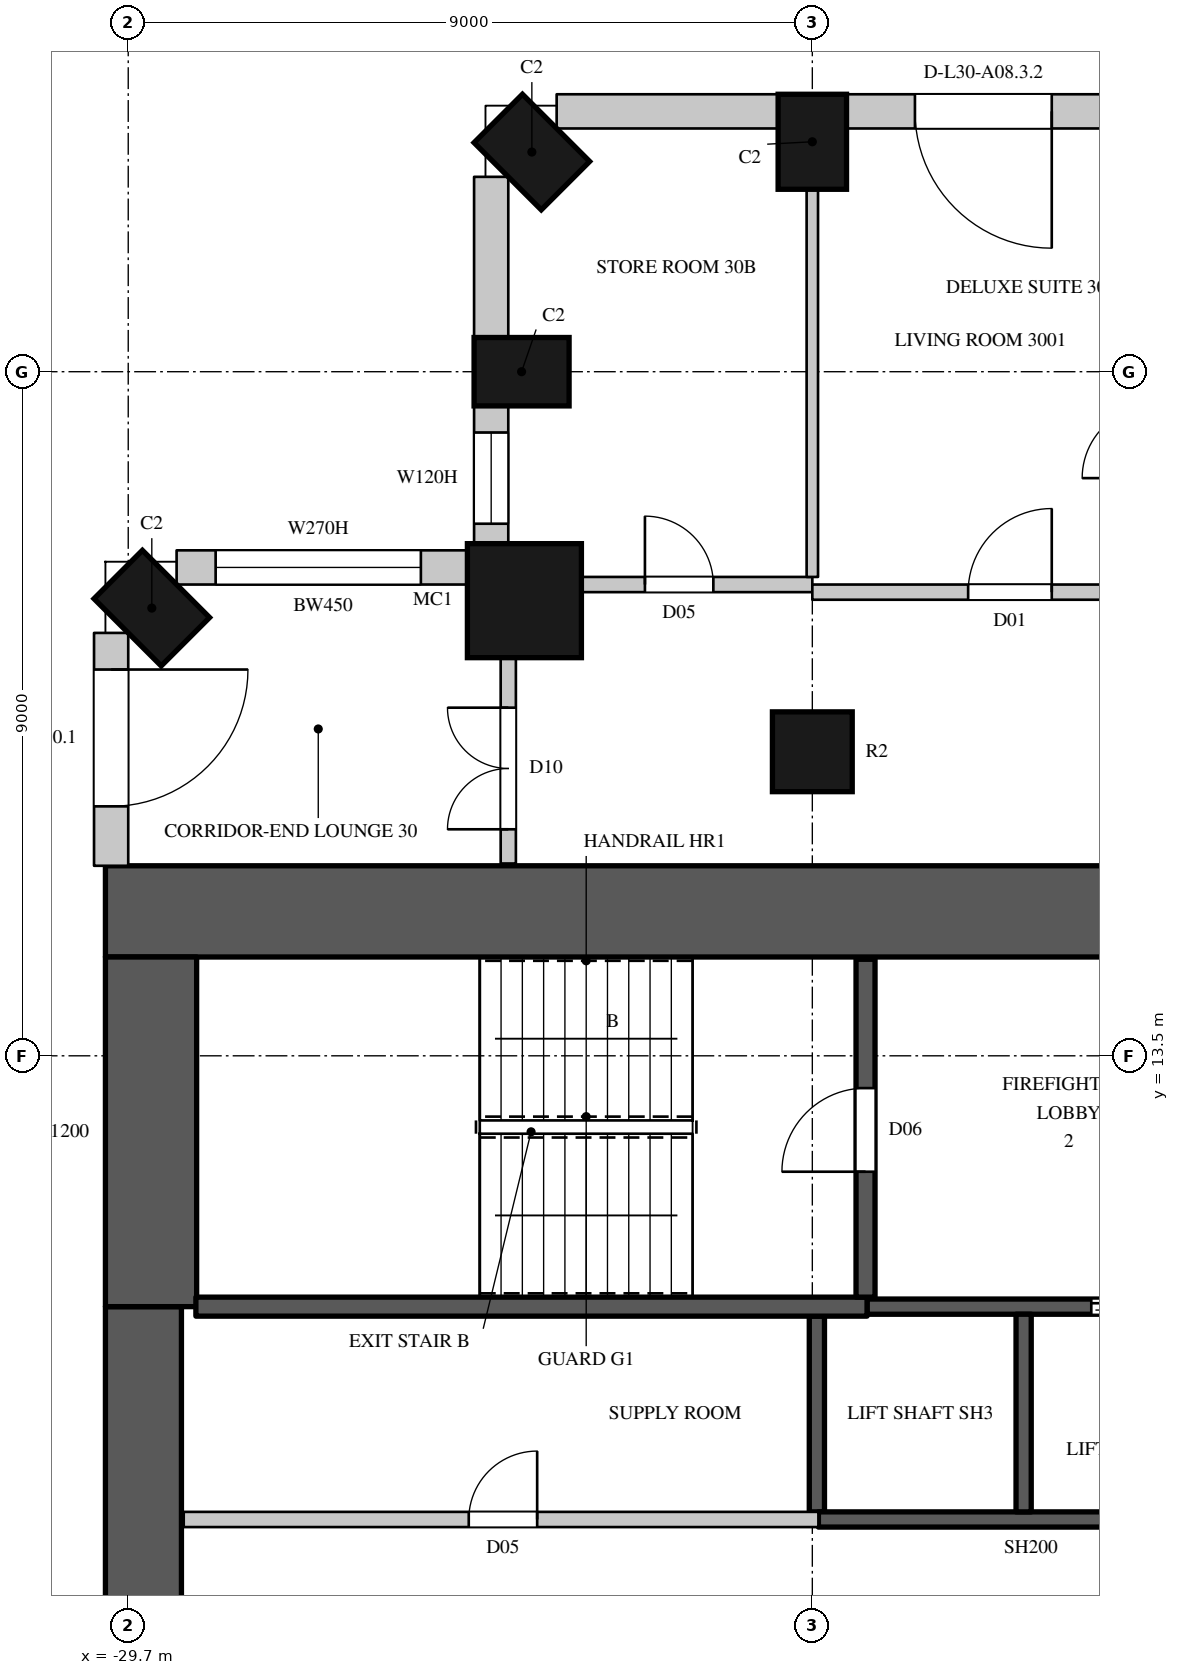
"""IFC4 building model, lengths in metres.
Left out: names, types, materials, properties, quantities, classifications, styles, units other than length and angle.
Written with IfcOpenShell. Run it as: python <this file> out.ifc"""

import sys

from ifc_helpers import new_model, si_unit, direction, frame, frame_2d, origin, origin_2d, place, context, subcontext, project, spatial, rectangle, circle, extrude, element, fill, save


model = new_model("IFC4")
c1 = context("Model", 3, precision=1e-05, world=origin(), true_north=direction((0.0, 1.0)))
c2 = subcontext(c1, "Body", "Model", "MODEL_VIEW")
j1 = project(units=[si_unit("LENGTHUNIT", "METRE"), si_unit("PLANEANGLEUNIT", "RADIAN")], contexts=[c1])
p1 = place(None, origin())
s1 = spatial("IfcSite", under=j1, at=p1, CompositionType="ELEMENT")
p2 = place(p1, origin())
s2 = spatial("IfcBuilding", under=s1, at=p2, CompositionType="ELEMENT")
p3 = place(p2, frame((0.0, 0.0, 138.3)))
s3 = spatial("IfcBuildingStorey", under=s2, at=p3, CompositionType="ELEMENT", Elevation=138.3)
for number, where, z_axis, x_axis in (
    (1, (-29.39, 19.39, 0.0), (0.0, 0.0, 1.0), (-0.707, -0.707, 0.0)),
    (2, (-20.7, 25.525, 0.0), (0.0, 0.0, 1.0), (-1.0, 0.0, 0.0)),
    (3, (-24.39, 25.39, 0.0), (0.0, 0.0, 1.0), (-0.707, -0.707, 0.0)),
    (4, (-24.525, 22.5, 0.0), (0.0, 0.0, 1.0), (0.0, -1.0, 0.0)),
):
    element("IfcColumn", number, at=place(p3, frame(where, z_axis=z_axis, x_axis=x_axis)), inside=s3, PredefinedType="COLUMN", context=c2, shape_type="SweptSolid", body=[
        extrude(rectangle(XDim=0.9, YDim=1.25, at=origin_2d()), origin(), (0.0, 0.0, 1.0), 3.6),
    ])
p4 = place(p3, frame((-24.488, 19.488, 0.0), z_axis=(0.0, 0.0, 1.0), x_axis=(1.0, 0.0, 0.0)))
e5 = element("IfcColumn", 5, at=p4, inside=s3, PredefinedType="COLUMN", context=c2, shape_type="SweptSolid", body=[
    extrude(circle(Radius=0.75, at=origin_2d()), origin(), (0.0, 0.0, 1.0), 3.6),
])
p5 = place(p3, frame((-20.7, 17.5, 0.0), z_axis=(0.0, 0.0, 1.0), x_axis=(1.0, 0.0, 0.0)))
e6 = element("IfcColumn", 6, at=p5, inside=s3, PredefinedType="COLUMN", context=c2, shape_type="SweptSolid", body=[
    extrude(circle(Radius=0.525, at=origin_2d()), origin(), (0.0, 0.0, 1.0), 3.6),
])
p6 = place(p3, frame((-29.925, 19.064, 0.0), z_axis=(0.0, 0.0, 1.0), x_axis=(0.0, -1.0, 0.0)))
e7 = element("IfcWall", 7, at=p6, inside=s3, PredefinedType="SOLIDWALL", context=c2, shape_type="SweptSolid", body=[
    extrude(rectangle(XDim=3.064, YDim=0.45, at=frame_2d((1.532, 0.0))), origin(), (0.0, 0.0, 1.0), 3.3),
])
p7 = place(p6, frame((0.482, 0.0, 0.0)))
e8 = element("IfcOpeningElement", 8, at=p7, cuts=e7, PredefinedType="OPENING", context=c2, shape_type="SweptSolid", body=[
    extrude(rectangle(XDim=1.8, YDim=2.4, at=frame_2d((0.9, 1.2))), frame((0.0, 0.235, 0.0), z_axis=(0.0, -1.0, 0.0), x_axis=(1.0, 0.0, 0.0)), (0.0, 0.0, 1.0), 0.47),
])
p8 = place(p3, frame((-12.15, 25.925, 0.0), z_axis=(0.0, 0.0, 1.0), x_axis=(-1.0, 0.0, 0.0)))
e9 = element("IfcWall", 9, at=p8, inside=s3, PredefinedType="SOLIDWALL", context=c2, shape_type="SweptSolid", body=[
    extrude(rectangle(XDim=8.1, YDim=0.45, at=frame_2d((4.05, 0.0))), origin(), (0.0, 0.0, 1.0), 3.3),
])
p9 = place(p8, frame((0.2, 0.0, 0.0)))
e10 = element("IfcOpeningElement", 10, at=p9, cuts=e9, PredefinedType="OPENING", context=c2, shape_type="SweptSolid", body=[
    extrude(rectangle(XDim=1.8, YDim=2.4, at=frame_2d((0.9, 1.2))), frame((0.0, 0.235, 0.0), z_axis=(0.0, -1.0, 0.0), x_axis=(1.0, 0.0, 0.0)), (0.0, 0.0, 1.0), 0.47),
])
p10 = place(p8, frame((2.2, 0.0, 1.05)))
e11 = element("IfcOpeningElement", 11, at=p10, cuts=e9, PredefinedType="OPENING", context=c2, shape_type="SweptSolid", body=[
    extrude(rectangle(XDim=1.2, YDim=2.0, at=frame_2d((0.6, 1.0))), frame((0.0, 0.235, 0.0), z_axis=(0.0, -1.0, 0.0), x_axis=(1.0, 0.0, 0.0)), (0.0, 0.0, 1.0), 0.47),
])
p11 = place(p8, frame((5.4, 0.0, 0.0)))
e12 = element("IfcOpeningElement", 12, at=p11, cuts=e9, PredefinedType="OPENING", context=c2, shape_type="SweptSolid", body=[
    extrude(rectangle(XDim=1.8, YDim=2.4, at=frame_2d((0.9, 1.2))), frame((0.0, 0.235, 0.0), z_axis=(0.0, -1.0, 0.0), x_axis=(1.0, 0.0, 0.0)), (0.0, 0.0, 1.0), 0.47),
])
p12 = place(p3, frame((-21.15, 25.925, 0.0), z_axis=(0.0, 0.0, 1.0), x_axis=(-1.0, 0.0, 0.0)))
e13 = element("IfcWall", 13, at=p12, inside=s3, PredefinedType="SOLIDWALL", context=c2, shape_type="SweptSolid", body=[
    extrude(rectangle(XDim=2.914, YDim=0.45, at=frame_2d((1.457, 0.0))), origin(), (0.0, 0.0, 1.0), 3.3),
])
p13 = place(p3, frame((-24.925, 25.064, 0.0), z_axis=(0.0, 0.0, 1.0), x_axis=(0.0, -1.0, 0.0)))
e14 = element("IfcWall", 14, at=p13, inside=s3, PredefinedType="SOLIDWALL", context=c2, shape_type="SweptSolid", body=[
    extrude(rectangle(XDim=2.114, YDim=0.45, at=frame_2d((1.057, 0.0))), origin(), (0.0, 0.0, 1.0), 3.3),
])
p14 = place(p3, frame((-24.925, 22.05, 0.0), z_axis=(0.0, 0.0, 1.0), x_axis=(0.0, -1.0, 0.0)))
e15 = element("IfcWall", 15, at=p14, inside=s3, PredefinedType="SOLIDWALL", context=c2, shape_type="SweptSolid", body=[
    extrude(rectangle(XDim=1.843, YDim=0.45, at=frame_2d((0.921, 0.0))), origin(), (0.0, 0.0, 1.0), 3.3),
])
p15 = place(p14, frame((0.35, 0.0, 1.05)))
e16 = element("IfcOpeningElement", 16, at=p15, cuts=e15, PredefinedType="OPENING", context=c2, shape_type="SweptSolid", body=[
    extrude(rectangle(XDim=1.2, YDim=2.0, at=frame_2d((0.6, 1.0))), frame((0.0, 0.235, 0.0), z_axis=(0.0, -1.0, 0.0), x_axis=(1.0, 0.0, 0.0)), (0.0, 0.0, 1.0), 0.47),
])
p16 = place(p3, frame((-25.207, 19.925, 0.0), z_axis=(0.0, 0.0, 1.0), x_axis=(-1.0, 0.0, 0.0)))
e17 = element("IfcWall", 17, at=p16, inside=s3, PredefinedType="SOLIDWALL", context=c2, shape_type="SweptSolid", body=[
    extrude(rectangle(XDim=3.857, YDim=0.45, at=frame_2d((1.928, 0.0))), origin(), (0.0, 0.0, 1.0), 3.3),
])
p17 = place(p16, frame((0.643, 0.0, 1.05)))
e18 = element("IfcOpeningElement", 18, at=p17, cuts=e17, PredefinedType="OPENING", context=c2, shape_type="SweptSolid", body=[
    extrude(rectangle(XDim=2.7, YDim=2.0, at=frame_2d((1.35, 1.0))), frame((0.0, 0.235, 0.0), z_axis=(0.0, -1.0, 0.0), x_axis=(1.0, 0.0, 0.0)), (0.0, 0.0, 1.0), 0.47),
])
p18 = place(p3, frame((-30.0, 15.4, 0.0), z_axis=(0.0, 0.0, 1.0), x_axis=(1.0, 0.0, 0.0)))
e19 = element("IfcWall", 19, at=p18, inside=s3, PredefinedType="SHEAR", context=c2, shape_type="SweptSolid", body=[
    extrude(rectangle(XDim=16.0, YDim=1.2, at=frame_2d((8.0, 0.0))), origin(), (0.0, 0.0, 1.0), 3.6),
])
p19 = place(p18, frame((13.4, 0.0, 0.0)))
e20 = element("IfcOpeningElement", 20, at=p19, cuts=e19, PredefinedType="OPENING", context=c2, shape_type="SweptSolid", body=[
    extrude(rectangle(XDim=1.5, YDim=2.4, at=frame_2d((0.75, 1.2))), frame((0.0, 0.61, 0.0), z_axis=(0.0, -1.0, 0.0), x_axis=(1.0, 0.0, 0.0)), (0.0, 0.0, 1.0), 1.22),
])
p20 = place(p3, frame((-29.5, -10.2, 0.0), z_axis=(0.0, 0.0, 1.0), x_axis=(0.0, 1.0, 0.0)))
e21 = element("IfcWall", 21, at=p20, inside=s3, PredefinedType="SHEAR", context=c2, shape_type="SweptSolid", body=[
    extrude(rectangle(XDim=20.4, YDim=1.0, at=frame_2d((10.2, 0.0))), origin(), (0.0, 0.0, 1.0), 3.6),
])
p21 = place(p3, frame((-29.4, 10.2, 0.0), z_axis=(0.0, 0.0, 1.0), x_axis=(0.0, 1.0, 0.0)))
e22 = element("IfcWall", 22, at=p21, inside=s3, PredefinedType="SHEAR", context=c2, shape_type="SweptSolid", body=[
    extrude(rectangle(XDim=4.6, YDim=1.2, at=frame_2d((2.3, 0.0))), origin(), (0.0, 0.0, 1.0), 3.6),
])
p22 = place(p3, frame((-28.97, 7.4, 0.0), z_axis=(0.0, 0.0, 1.0), x_axis=(1.0, 0.0, 0.0)))
e23 = element("IfcWall", 23, at=p22, inside=s3, PredefinedType="PARTITIONING", context=c2, shape_type="SweptSolid", body=[
    extrude(rectangle(XDim=8.35, YDim=0.2, at=frame_2d((4.175, 0.0))), origin(), (0.0, 0.0, 1.0), 3.3),
])
p23 = place(p22, frame((3.75, 0.0, 0.0)))
e24 = element("IfcOpeningElement", 24, at=p23, cuts=e23, PredefinedType="OPENING", context=c2, shape_type="SweptSolid", body=[
    extrude(rectangle(XDim=0.9, YDim=2.2, at=frame_2d((0.45, 1.1))), frame((0.0, 0.11, 0.0), z_axis=(0.0, -1.0, 0.0), x_axis=(1.0, 0.0, 0.0)), (0.0, 0.0, 1.0), 0.22),
])
p24 = place(p3, frame((-24.7, 16.03, 0.0), z_axis=(0.0, 0.0, 1.0), x_axis=(0.0, 1.0, 0.0)))
e25 = element("IfcWall", 25, at=p24, inside=s3, PredefinedType="PARTITIONING", context=c2, shape_type="SweptSolid", body=[
    extrude(rectangle(XDim=2.722, YDim=0.2, at=frame_2d((1.361, 0.0))), origin(), (0.0, 0.0, 1.0), 3.3),
])
p25 = place(p24, frame((0.45, 0.0, 0.0)))
e26 = element("IfcOpeningElement", 26, at=p25, cuts=e25, PredefinedType="OPENING", context=c2, shape_type="SweptSolid", body=[
    extrude(rectangle(XDim=1.6, YDim=2.4, at=frame_2d((0.8, 1.2))), frame((0.0, 0.11, 0.0), z_axis=(0.0, -1.0, 0.0), x_axis=(1.0, 0.0, 0.0)), (0.0, 0.0, 1.0), 0.22),
])
p26 = place(p3, frame((-23.752, 19.7, 0.0), z_axis=(0.0, 0.0, 1.0), x_axis=(1.0, 0.0, 0.0)))
e27 = element("IfcWall", 27, at=p26, inside=s3, PredefinedType="PARTITIONING", context=c2, shape_type="SweptSolid", body=[
    extrude(rectangle(XDim=3.052, YDim=0.2, at=frame_2d((1.526, 0.0))), origin(), (0.0, 0.0, 1.0), 3.3),
])
p27 = place(p26, frame((0.85, 0.0, 0.0)))
e28 = element("IfcOpeningElement", 28, at=p27, cuts=e27, PredefinedType="OPENING", context=c2, shape_type="SweptSolid", body=[
    extrude(rectangle(XDim=0.9, YDim=2.2, at=frame_2d((0.45, 1.1))), frame((0.0, 0.11, 0.0), z_axis=(0.0, -1.0, 0.0), x_axis=(1.0, 0.0, 0.0)), (0.0, 0.0, 1.0), 0.22),
])
p28 = place(p3, frame((-20.7, 19.6, 0.0), z_axis=(0.0, 0.0, 1.0), x_axis=(1.0, 0.0, 0.0)))
e29 = element("IfcWall", 29, at=p28, inside=s3, PredefinedType="PARTITIONING", context=c2, shape_type="SweptSolid", body=[
    extrude(rectangle(XDim=38.214, YDim=0.2, at=frame_2d((19.107, 0.0))), origin(), (0.0, 0.0, 1.0), 3.3),
])
p29 = place(p28, frame((23.95, 0.0, 0.0)))
e30 = element("IfcOpeningElement", 30, at=p29, cuts=e29, PredefinedType="OPENING", context=c2, shape_type="SweptSolid", body=[
    extrude(rectangle(XDim=0.9, YDim=2.2, at=frame_2d((0.45, 1.1))), frame((0.0, 0.11, 0.0), z_axis=(0.0, -1.0, 0.0), x_axis=(1.0, 0.0, 0.0)), (0.0, 0.0, 1.0), 0.22),
])
p30 = place(p28, frame((2.05, 0.0, 0.0)))
e31 = element("IfcOpeningElement", 31, at=p30, cuts=e29, PredefinedType="OPENING", context=c2, shape_type="SweptSolid", body=[
    extrude(rectangle(XDim=1.1, YDim=2.4, at=frame_2d((0.55, 1.2))), frame((0.0, 0.11, 0.0), z_axis=(0.0, -1.0, 0.0), x_axis=(1.0, 0.0, 0.0)), (0.0, 0.0, 1.0), 0.22),
])
p31 = place(p28, frame((12.15, 0.0, 0.0)))
e32 = element("IfcOpeningElement", 32, at=p31, cuts=e29, PredefinedType="OPENING", context=c2, shape_type="SweptSolid", body=[
    extrude(rectangle(XDim=1.1, YDim=2.4, at=frame_2d((0.55, 1.2))), frame((0.0, 0.11, 0.0), z_axis=(0.0, -1.0, 0.0), x_axis=(1.0, 0.0, 0.0)), (0.0, 0.0, 1.0), 0.22),
])
p32 = place(p28, frame((30.2, 0.0, 0.0)))
e33 = element("IfcOpeningElement", 33, at=p32, cuts=e29, PredefinedType="OPENING", context=c2, shape_type="SweptSolid", body=[
    extrude(rectangle(XDim=0.95, YDim=2.2, at=frame_2d((0.475, 1.1))), frame((0.0, 0.11, 0.0), z_axis=(0.0, -1.0, 0.0), x_axis=(1.0, 0.0, 0.0)), (0.0, 0.0, 1.0), 0.22),
])
p33 = place(p28, frame((36.95, 0.0, 0.0)))
e34 = element("IfcOpeningElement", 34, at=p33, cuts=e29, PredefinedType="OPENING", context=c2, shape_type="SweptSolid", body=[
    extrude(rectangle(XDim=0.95, YDim=2.2, at=frame_2d((0.475, 1.1))), frame((0.0, 0.11, 0.0), z_axis=(0.0, -1.0, 0.0), x_axis=(1.0, 0.0, 0.0)), (0.0, 0.0, 1.0), 0.22),
])
p34 = place(p3, frame((-20.7, 19.8, 0.0), z_axis=(0.0, 0.0, 1.0), x_axis=(0.0, 1.0, 0.0)))
e35 = element("IfcWall", 35, at=p34, inside=s3, PredefinedType="PARTITIONING", context=c2, shape_type="SweptSolid", body=[
    extrude(rectangle(XDim=5.1, YDim=0.15, at=frame_2d((2.55, 0.0))), origin(), (0.0, 0.0, 1.0), 2.75),
])
p35 = place(p3, frame((-20.64, 7.5, 0.0), z_axis=(0.0, 0.0, 1.0), x_axis=(0.0, 1.0, 0.0)))
e36 = element("IfcWall", 36, at=p35, inside=s3, PredefinedType="SHEAR", context=c2, shape_type="SweptSolid", body=[
    extrude(rectangle(XDim=2.575, YDim=0.2, at=frame_2d((1.288, 0.0))), origin(), (0.0, 0.0, 1.0), 3.3),
])
p36 = place(p3, frame((-20.62, 7.4, 0.0), z_axis=(0.0, 0.0, 1.0), x_axis=(1.0, 0.0, 0.0)))
e37 = element("IfcWall", 37, at=p36, inside=s3, PredefinedType="SHEAR", context=c2, shape_type="SweptSolid", body=[
    extrude(rectangle(XDim=5.59, YDim=0.2, at=frame_2d((2.795, 0.0))), origin(), (0.0, 0.0, 1.0), 3.3),
])
p37 = place(p3, frame((-19.98, 10.2, 0.0), z_axis=(0.0, 0.0, 1.0), x_axis=(1.0, 0.0, 0.0)))
e38 = element("IfcWall", 38, at=p37, inside=s3, PredefinedType="SHEAR", context=c2, shape_type="SweptSolid", body=[
    extrude(rectangle(XDim=4.95, YDim=0.2, at=frame_2d((2.475, 0.0))), origin(), (0.0, 0.0, 1.0), 3.3),
])
p38 = place(p37, frame((2.95, 0.0, 0.0)))
e39 = element("IfcOpeningElement", 39, at=p38, cuts=e38, PredefinedType="OPENING", context=c2, shape_type="SweptSolid", body=[
    extrude(rectangle(XDim=1.1, YDim=2.2, at=frame_2d((0.55, 1.1))), frame((0.0, 0.11, 0.0), z_axis=(0.0, -1.0, 0.0), x_axis=(1.0, 0.0, 0.0)), (0.0, 0.0, 1.0), 0.22),
])
p39 = place(p3, frame((-17.92, 7.5, 0.0), z_axis=(0.0, 0.0, 1.0), x_axis=(0.0, 1.0, 0.0)))
e40 = element("IfcWall", 40, at=p39, inside=s3, PredefinedType="SHEAR", context=c2, shape_type="SweptSolid", body=[
    extrude(rectangle(XDim=2.6, YDim=0.2, at=frame_2d((1.3, 0.0))), origin(), (0.0, 0.0, 1.0), 3.6),
])
p40 = place(p3, frame((-28.81, 10.2, 0.0), z_axis=(0.0, 0.0, 1.0), x_axis=(1.0, 0.0, 0.0)))
e41 = element("IfcWall", 41, at=p40, inside=s3, PredefinedType="SHEAR", context=c2, shape_type="SweptSolid", body=[
    extrude(rectangle(XDim=8.83, YDim=0.25, at=frame_2d((4.415, 0.0))), origin(), (0.0, 0.0, 1.0), 3.3),
])
p41 = place(p3, frame((-20.0, 10.325, 0.0), z_axis=(0.0, 0.0, 1.0), x_axis=(0.0, 1.0, 0.0)))
e42 = element("IfcWall", 42, at=p41, inside=s3, PredefinedType="SHEAR", context=c2, shape_type="SweptSolid", body=[
    extrude(rectangle(XDim=4.445, YDim=0.25, at=frame_2d((2.223, 0.0))), origin(), (0.0, 0.0, 1.0), 3.3),
])
p42 = place(p41, frame((1.65, 0.0, 0.0)))
e43 = element("IfcOpeningElement", 43, at=p42, cuts=e42, PredefinedType="OPENING", context=c2, shape_type="SweptSolid", body=[
    extrude(rectangle(XDim=1.1, YDim=2.2, at=frame_2d((0.55, 1.1))), frame((0.0, 0.135, 0.0), z_axis=(0.0, -1.0, 0.0), x_axis=(1.0, 0.0, 0.0)), (0.0, 0.0, 1.0), 0.27),
])
p43 = place(p7, origin())
e44 = element("IfcDoor", 44, at=p43, inside=s3, OperationType="SLIDING_TO_LEFT", PredefinedType="DOOR", context=c2, shape_type="SweptSolid", body=[
    extrude(rectangle(XDim=1.8, YDim=2.4, at=frame_2d((0.9, 1.2))), frame((0.0, 0.13, 0.0), z_axis=(0.0, -1.0, 0.0), x_axis=(1.0, 0.0, 0.0)), (0.0, 0.0, 1.0), 0.05),
])
fill(e8, e44)
p44 = place(p11, origin())
e45 = element("IfcDoor", 45, at=p44, inside=s3, OperationType="SLIDING_TO_LEFT", PredefinedType="DOOR", context=c2, shape_type="SweptSolid", body=[
    extrude(rectangle(XDim=1.8, YDim=2.4, at=frame_2d((0.9, 1.2))), frame((0.0, 0.13, 0.0), z_axis=(0.0, -1.0, 0.0), x_axis=(1.0, 0.0, 0.0)), (0.0, 0.0, 1.0), 0.05),
])
fill(e12, e45)
p45 = place(p15, origin())
e46 = element("IfcWindow", 46, at=p45, inside=s3, PartitioningType="SINGLE_PANEL", PredefinedType="WINDOW", context=c2, shape_type="SweptSolid", body=[
    extrude(rectangle(XDim=1.2, YDim=2.0, at=frame_2d((0.6, 1.0))), frame((0.0, 0.135, 0.0), z_axis=(0.0, -1.0, 0.0), x_axis=(1.0, 0.0, 0.0)), (0.0, 0.0, 1.0), 0.06),
])
fill(e16, e46)
p46 = place(p17, origin())
e47 = element("IfcWindow", 47, at=p46, inside=s3, PartitioningType="SINGLE_PANEL", PredefinedType="WINDOW", context=c2, shape_type="SweptSolid", body=[
    extrude(rectangle(XDim=2.7, YDim=2.0, at=frame_2d((1.35, 1.0))), frame((0.0, 0.135, 0.0), z_axis=(0.0, -1.0, 0.0), x_axis=(1.0, 0.0, 0.0)), (0.0, 0.0, 1.0), 0.06),
])
fill(e18, e47)
p47 = place(p42, origin())
e48 = element("IfcDoor", 48, at=p47, inside=s3, OperationType="SINGLE_SWING_LEFT", PredefinedType="DOOR", context=c2, shape_type="SweptSolid", body=[
    extrude(rectangle(XDim=1.1, YDim=2.2, at=frame_2d((0.55, 1.1))), frame((0.0, 0.025, 0.0), z_axis=(0.0, -1.0, 0.0), x_axis=(1.0, 0.0, 0.0)), (0.0, 0.0, 1.0), 0.05),
])
fill(e43, e48)
p48 = place(p23, origin())
e49 = element("IfcDoor", 49, at=p48, inside=s3, OperationType="SINGLE_SWING_RIGHT", PredefinedType="DOOR", context=c2, shape_type="SweptSolid", body=[
    extrude(rectangle(XDim=0.9, YDim=2.2, at=frame_2d((0.45, 1.1))), frame((0.0, 0.025, 0.0), z_axis=(0.0, -1.0, 0.0), x_axis=(1.0, 0.0, 0.0)), (0.0, 0.0, 1.0), 0.05),
])
fill(e24, e49)
p49 = place(p38, origin())
e50 = element("IfcDoor", 50, at=p49, inside=s3, OperationType="DOUBLE_DOOR_SLIDING", PredefinedType="DOOR", context=c2, shape_type="SweptSolid", body=[
    extrude(rectangle(XDim=1.1, YDim=2.2, at=frame_2d((0.55, 1.1))), frame((0.0, 0.025, 0.0), z_axis=(0.0, -1.0, 0.0), x_axis=(1.0, 0.0, 0.0)), (0.0, 0.0, 1.0), 0.05),
])
fill(e39, e50)
p50 = place(p27, origin())
e51 = element("IfcDoor", 51, at=p50, inside=s3, OperationType="SINGLE_SWING_LEFT", PredefinedType="DOOR", context=c2, shape_type="SweptSolid", body=[
    extrude(rectangle(XDim=0.9, YDim=2.2, at=frame_2d((0.45, 1.1))), frame((0.0, 0.025, 0.0), z_axis=(0.0, -1.0, 0.0), x_axis=(1.0, 0.0, 0.0)), (0.0, 0.0, 1.0), 0.05),
])
fill(e28, e51)
p51 = place(p25, origin())
e52 = element("IfcDoor", 52, at=p51, inside=s3, OperationType="DOUBLE_DOOR_SINGLE_SWING", PredefinedType="DOOR", context=c2, shape_type="SweptSolid", body=[
    extrude(rectangle(XDim=1.6, YDim=2.4, at=frame_2d((0.8, 1.2))), frame((0.0, 0.025, 0.0), z_axis=(0.0, -1.0, 0.0), x_axis=(1.0, 0.0, 0.0)), (0.0, 0.0, 1.0), 0.05),
])
fill(e26, e52)
p52 = place(p30, origin())
e53 = element("IfcDoor", 53, at=p52, inside=s3, OperationType="SINGLE_SWING_RIGHT", PredefinedType="DOOR", context=c2, shape_type="SweptSolid", body=[
    extrude(rectangle(XDim=1.1, YDim=2.4, at=frame_2d((0.55, 1.2))), frame((0.0, 0.025, 0.0), z_axis=(0.0, -1.0, 0.0), x_axis=(1.0, 0.0, 0.0)), (0.0, 0.0, 1.0), 0.05),
])
fill(e31, e53)
save(model, sys.argv[1])
